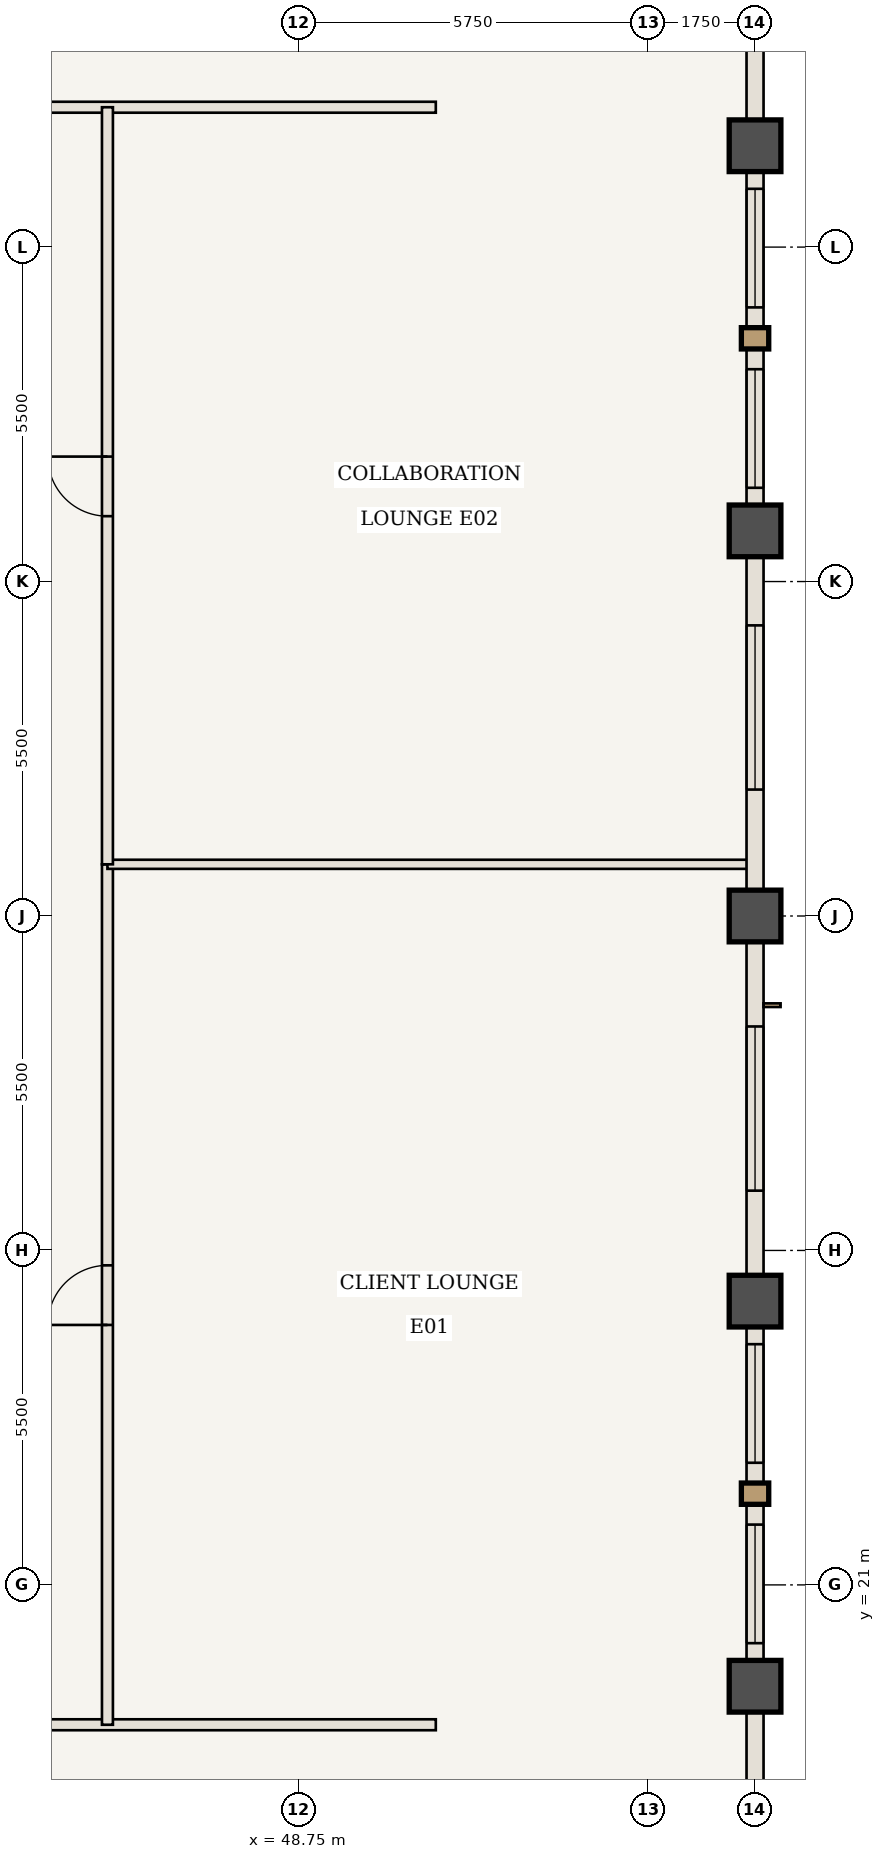
"""IFC4 building model, lengths in metres.
Left out: names, types, materials, properties, quantities, classifications, styles, units other than length and angle.
Written with IfcOpenShell. Run it as: python <this file> out.ifc"""

import sys

from ifc_helpers import new_model, si_unit, direction, frame, frame_2d, origin, origin_2d, place, context, subcontext, project, spatial, rectangle, extrude, element, fill, save


model = new_model("IFC4")
c1 = context("Model", 3, precision=1e-05, world=origin(), true_north=direction((0.0, 1.0)))
c2 = subcontext(c1, "Body", "Model", "MODEL_VIEW")
j1 = project(units=[si_unit("LENGTHUNIT", "METRE"), si_unit("PLANEANGLEUNIT", "RADIAN")], contexts=[c1])
p1 = place(None, origin())
s1 = spatial("IfcSite", under=j1, at=p1, CompositionType="ELEMENT")
p2 = place(p1, origin())
s2 = spatial("IfcBuilding", under=s1, at=p2, CompositionType="ELEMENT")
p3 = place(p2, frame((0.0, 0.0, 213.85)))
s3 = spatial("IfcBuildingStorey", under=s2, at=p3, CompositionType="ELEMENT", Elevation=213.85)
for number, where, z_axis, x_axis in (
    (1, (56.25, 19.333, 0.0), (0.0, 0.0, 1.0), (1.0, 0.0, 0.0)),
    (2, (56.25, 25.667, 0.0), (0.0, 0.0, 1.0), (1.0, 0.0, 0.0)),
    (3, (56.25, 32.0, 0.0), (0.0, 0.0, 1.0), (1.0, 0.0, 0.0)),
    (4, (56.25, 38.333, 0.0), (0.0, 0.0, 1.0), (1.0, 0.0, 0.0)),
    (5, (56.25, 44.667, 0.0), (0.0, 0.0, 1.0), (1.0, 0.0, 0.0)),
):
    element("IfcColumn", number, at=place(p3, frame(where, z_axis=z_axis, x_axis=x_axis)), inside=s3, PredefinedType="COLUMN", context=c2, shape_type="SweptSolid", body=[
        extrude(rectangle(XDim=0.85, YDim=0.85, at=origin_2d()), origin(), (0.0, 0.0, 1.0), 3.85),
    ])
p4 = place(p3, frame((32.925, 18.7, 0.0), z_axis=(0.0, 0.0, 1.0), x_axis=(1.0, 0.0, 0.0)))
e6 = element("IfcWall", 6, at=p4, inside=s3, PredefinedType="STANDARD", context=c2, shape_type="SweptSolid", body=[
    extrude(rectangle(XDim=18.075, YDim=0.18, at=frame_2d((9.038, 0.0))), origin(), (0.0, 0.0, 1.0), 3.685),
])
p5 = place(p4, frame((5.812, 0.0, 0.0)))
e7 = element("IfcOpeningElement", 7, at=p5, cuts=e6, PredefinedType="OPENING", context=c2, shape_type="SweptSolid", body=[
    extrude(rectangle(XDim=0.98, YDim=2.2, at=frame_2d((0.49, 1.1))), frame((0.0, 0.1, 0.0), z_axis=(0.0, -1.0, 0.0), x_axis=(1.0, 0.0, 0.0)), (0.0, 0.0, 1.0), 0.2),
])
p6 = place(p3, frame((24.542, 45.3, 0.0), z_axis=(0.0, 0.0, 1.0), x_axis=(1.0, 0.0, 0.0)))
e8 = element("IfcWall", 8, at=p6, inside=s3, PredefinedType="STANDARD", context=c2, shape_type="SweptSolid", body=[
    extrude(rectangle(XDim=26.458, YDim=0.18, at=frame_2d((13.229, 0.0))), origin(), (0.0, 0.0, 1.0), 3.685),
])
p7 = place(p6, frame((10.004, 0.0, 0.0)))
e9 = element("IfcOpeningElement", 9, at=p7, cuts=e8, PredefinedType="OPENING", context=c2, shape_type="SweptSolid", body=[
    extrude(rectangle(XDim=0.98, YDim=2.2, at=frame_2d((0.49, 1.1))), frame((0.0, 0.1, 0.0), z_axis=(0.0, -1.0, 0.0), x_axis=(1.0, 0.0, 0.0)), (0.0, 0.0, 1.0), 0.2),
])
p8 = place(p3, frame((45.6, 18.7, 0.0), z_axis=(0.0, 0.0, 1.0), x_axis=(0.0, 1.0, 0.0)))
e10 = element("IfcWall", 10, at=p8, inside=s3, PredefinedType="STANDARD", context=c2, shape_type="SweptSolid", body=[
    extrude(rectangle(XDim=14.15, YDim=0.18, at=frame_2d((7.075, 0.0))), origin(), (0.0, 0.0, 1.0), 3.685),
])
p9 = place(p8, frame((6.575, 0.0, 0.0)))
e11 = element("IfcOpeningElement", 11, at=p9, cuts=e10, PredefinedType="OPENING", context=c2, shape_type="SweptSolid", body=[
    extrude(rectangle(XDim=0.98, YDim=2.2, at=frame_2d((0.49, 1.1))), frame((0.0, 0.1, 0.0), z_axis=(0.0, -1.0, 0.0), x_axis=(1.0, 0.0, 0.0)), (0.0, 0.0, 1.0), 0.2),
])
p10 = place(p3, frame((45.6, 32.85, 0.0), z_axis=(0.0, 0.0, 1.0), x_axis=(1.0, 0.0, 0.0)))
e12 = element("IfcWall", 12, at=p10, inside=s3, PredefinedType="STANDARD", context=c2, shape_type="SweptSolid", body=[
    extrude(rectangle(XDim=10.59, YDim=0.15, at=frame_2d((5.295, 0.0))), origin(), (0.0, 0.0, 1.0), 3.685),
])
p11 = place(p3, frame((45.6, 32.85, 0.0), z_axis=(0.0, 0.0, 1.0), x_axis=(0.0, 1.0, 0.0)))
e13 = element("IfcWall", 13, at=p11, inside=s3, PredefinedType="STANDARD", context=c2, shape_type="SweptSolid", body=[
    extrude(rectangle(XDim=12.45, YDim=0.18, at=frame_2d((6.225, 0.0))), origin(), (0.0, 0.0, 1.0), 3.685),
])
p12 = place(p11, frame((5.725, 0.0, 0.0)))
e14 = element("IfcOpeningElement", 14, at=p12, cuts=e13, PredefinedType="OPENING", context=c2, shape_type="SweptSolid", body=[
    extrude(rectangle(XDim=0.98, YDim=2.2, at=frame_2d((0.49, 1.1))), frame((0.0, 0.1, 0.0), z_axis=(0.0, -1.0, 0.0), x_axis=(1.0, 0.0, 0.0)), (0.0, 0.0, 1.0), 0.2),
])
p13 = place(p3, frame((56.25, 19.333, 0.0), z_axis=(0.0, 0.0, 1.0), x_axis=(0.0, -1.0, 0.0)))
e15 = element("IfcWall", 15, at=p13, inside=s3, PredefinedType="USERDEFINED", context=c2, shape_type="SweptSolid", body=[
    extrude(rectangle(XDim=6.333, YDim=0.28, at=frame_2d((3.167, 0.0))), origin(), (0.0, 0.0, 1.0), 2.985),
])
p14 = place(p3, frame((56.25, 25.667, 0.0), z_axis=(0.0, 0.0, 1.0), x_axis=(0.0, -1.0, 0.0)))
e16 = element("IfcWall", 16, at=p14, inside=s3, PredefinedType="USERDEFINED", context=c2, shape_type="SweptSolid", body=[
    extrude(rectangle(XDim=6.333, YDim=0.28, at=frame_2d((3.167, 0.0))), origin(), (0.0, 0.0, 1.0), 2.985),
])
p15 = place(p14, frame((0.708, 0.0, 0.85)))
e17 = element("IfcOpeningElement", 17, at=p15, cuts=e16, PredefinedType="OPENING", context=c2, shape_type="SweptSolid", body=[
    extrude(rectangle(XDim=1.95, YDim=1.935, at=frame_2d((0.975, 0.968))), frame((0.0, 0.15, 0.0), z_axis=(0.0, -1.0, 0.0), x_axis=(1.0, 0.0, 0.0)), (0.0, 0.0, 1.0), 0.3),
])
p16 = place(p14, frame((3.675, 0.0, 0.85)))
e18 = element("IfcOpeningElement", 18, at=p16, cuts=e16, PredefinedType="OPENING", context=c2, shape_type="SweptSolid", body=[
    extrude(rectangle(XDim=1.95, YDim=1.935, at=frame_2d((0.975, 0.968))), frame((0.0, 0.15, 0.0), z_axis=(0.0, -1.0, 0.0), x_axis=(1.0, 0.0, 0.0)), (0.0, 0.0, 1.0), 0.3),
])
p17 = place(p3, frame((56.25, 32.0, 0.0), z_axis=(0.0, 0.0, 1.0), x_axis=(0.0, -1.0, 0.0)))
e19 = element("IfcWall", 19, at=p17, inside=s3, PredefinedType="USERDEFINED", context=c2, shape_type="SweptSolid", body=[
    extrude(rectangle(XDim=6.333, YDim=0.28, at=frame_2d((3.167, 0.0))), origin(), (0.0, 0.0, 1.0), 2.985),
])
p18 = place(p17, frame((1.817, 0.0, 0.85)))
e20 = element("IfcOpeningElement", 20, at=p18, cuts=e19, PredefinedType="OPENING", context=c2, shape_type="SweptSolid", body=[
    extrude(rectangle(XDim=2.7, YDim=1.935, at=frame_2d((1.35, 0.968))), frame((0.0, 0.15, 0.0), z_axis=(0.0, -1.0, 0.0), x_axis=(1.0, 0.0, 0.0)), (0.0, 0.0, 1.0), 0.3),
])
p19 = place(p3, frame((56.25, 38.333, 0.0), z_axis=(0.0, 0.0, 1.0), x_axis=(0.0, -1.0, 0.0)))
e21 = element("IfcWall", 21, at=p19, inside=s3, PredefinedType="USERDEFINED", context=c2, shape_type="SweptSolid", body=[
    extrude(rectangle(XDim=6.333, YDim=0.28, at=frame_2d((3.167, 0.0))), origin(), (0.0, 0.0, 1.0), 2.985),
])
p20 = place(p19, frame((1.554, 0.0, 0.85)))
e22 = element("IfcOpeningElement", 22, at=p20, cuts=e21, PredefinedType="OPENING", context=c2, shape_type="SweptSolid", body=[
    extrude(rectangle(XDim=2.7, YDim=1.935, at=frame_2d((1.35, 0.968))), frame((0.0, 0.15, 0.0), z_axis=(0.0, -1.0, 0.0), x_axis=(1.0, 0.0, 0.0)), (0.0, 0.0, 1.0), 0.3),
])
p21 = place(p3, frame((56.25, 44.667, 0.0), z_axis=(0.0, 0.0, 1.0), x_axis=(0.0, -1.0, 0.0)))
e23 = element("IfcWall", 23, at=p21, inside=s3, PredefinedType="USERDEFINED", context=c2, shape_type="SweptSolid", body=[
    extrude(rectangle(XDim=6.333, YDim=0.28, at=frame_2d((3.167, 0.0))), origin(), (0.0, 0.0, 1.0), 2.985),
])
p22 = place(p21, frame((0.708, 0.0, 0.85)))
e24 = element("IfcOpeningElement", 24, at=p22, cuts=e23, PredefinedType="OPENING", context=c2, shape_type="SweptSolid", body=[
    extrude(rectangle(XDim=1.95, YDim=1.935, at=frame_2d((0.975, 0.968))), frame((0.0, 0.15, 0.0), z_axis=(0.0, -1.0, 0.0), x_axis=(1.0, 0.0, 0.0)), (0.0, 0.0, 1.0), 0.3),
])
p23 = place(p21, frame((3.675, 0.0, 0.85)))
e25 = element("IfcOpeningElement", 25, at=p23, cuts=e23, PredefinedType="OPENING", context=c2, shape_type="SweptSolid", body=[
    extrude(rectangle(XDim=1.95, YDim=1.935, at=frame_2d((0.975, 0.968))), frame((0.0, 0.15, 0.0), z_axis=(0.0, -1.0, 0.0), x_axis=(1.0, 0.0, 0.0)), (0.0, 0.0, 1.0), 0.3),
])
p24 = place(p3, frame((56.25, 51.0, 0.0), z_axis=(0.0, 0.0, 1.0), x_axis=(0.0, -1.0, 0.0)))
e26 = element("IfcWall", 26, at=p24, inside=s3, PredefinedType="USERDEFINED", context=c2, shape_type="SweptSolid", body=[
    extrude(rectangle(XDim=6.333, YDim=0.28, at=frame_2d((3.167, 0.0))), origin(), (0.0, 0.0, 1.0), 2.985),
])
p25 = place(p9, origin())
e27 = element("IfcDoor", 27, at=p25, inside=s3, OperationType="SINGLE_SWING_LEFT", PredefinedType="DOOR", context=c2, shape_type="SweptSolid", body=[
    extrude(rectangle(XDim=0.98, YDim=2.2, at=frame_2d((0.49, 1.1))), frame((0.0, 0.025, 0.0), z_axis=(0.0, -1.0, 0.0), x_axis=(1.0, 0.0, 0.0)), (0.0, 0.0, 1.0), 0.05),
])
fill(e11, e27)
p26 = place(p12, origin())
e28 = element("IfcDoor", 28, at=p26, inside=s3, OperationType="SINGLE_SWING_RIGHT", PredefinedType="DOOR", context=c2, shape_type="SweptSolid", body=[
    extrude(rectangle(XDim=0.98, YDim=2.2, at=frame_2d((0.49, 1.1))), frame((0.0, 0.025, 0.0), z_axis=(0.0, -1.0, 0.0), x_axis=(1.0, 0.0, 0.0)), (0.0, 0.0, 1.0), 0.05),
])
fill(e14, e28)
p27 = place(p15, origin())
e29 = element("IfcWindow", 29, at=p27, inside=s3, PartitioningType="SINGLE_PANEL", PredefinedType="WINDOW", context=c2, shape_type="SweptSolid", body=[
    extrude(rectangle(XDim=1.95, YDim=1.935, at=frame_2d((0.975, 0.968))), frame((0.0, 0.03, 0.0), z_axis=(0.0, -1.0, 0.0), x_axis=(1.0, 0.0, 0.0)), (0.0, 0.0, 1.0), 0.06),
])
fill(e17, e29)
p28 = place(p16, origin())
e30 = element("IfcWindow", 30, at=p28, inside=s3, PartitioningType="SINGLE_PANEL", PredefinedType="WINDOW", context=c2, shape_type="SweptSolid", body=[
    extrude(rectangle(XDim=1.95, YDim=1.935, at=frame_2d((0.975, 0.968))), frame((0.0, 0.03, 0.0), z_axis=(0.0, -1.0, 0.0), x_axis=(1.0, 0.0, 0.0)), (0.0, 0.0, 1.0), 0.06),
])
fill(e18, e30)
p29 = place(p18, origin())
e31 = element("IfcWindow", 31, at=p29, inside=s3, PartitioningType="SINGLE_PANEL", PredefinedType="WINDOW", context=c2, shape_type="SweptSolid", body=[
    extrude(rectangle(XDim=2.7, YDim=1.935, at=frame_2d((1.35, 0.968))), frame((0.0, 0.03, 0.0), z_axis=(0.0, -1.0, 0.0), x_axis=(1.0, 0.0, 0.0)), (0.0, 0.0, 1.0), 0.06),
])
fill(e20, e31)
p30 = place(p20, origin())
e32 = element("IfcWindow", 32, at=p30, inside=s3, PartitioningType="SINGLE_PANEL", PredefinedType="WINDOW", context=c2, shape_type="SweptSolid", body=[
    extrude(rectangle(XDim=2.7, YDim=1.935, at=frame_2d((1.35, 0.968))), frame((0.0, 0.03, 0.0), z_axis=(0.0, -1.0, 0.0), x_axis=(1.0, 0.0, 0.0)), (0.0, 0.0, 1.0), 0.06),
])
fill(e22, e32)
p31 = place(p22, origin())
e33 = element("IfcWindow", 33, at=p31, inside=s3, PartitioningType="SINGLE_PANEL", PredefinedType="WINDOW", context=c2, shape_type="SweptSolid", body=[
    extrude(rectangle(XDim=1.95, YDim=1.935, at=frame_2d((0.975, 0.968))), frame((0.0, 0.03, 0.0), z_axis=(0.0, -1.0, 0.0), x_axis=(1.0, 0.0, 0.0)), (0.0, 0.0, 1.0), 0.06),
])
fill(e24, e33)
p32 = place(p23, origin())
e34 = element("IfcWindow", 34, at=p32, inside=s3, PartitioningType="SINGLE_PANEL", PredefinedType="WINDOW", context=c2, shape_type="SweptSolid", body=[
    extrude(rectangle(XDim=1.95, YDim=1.935, at=frame_2d((0.975, 0.968))), frame((0.0, 0.03, 0.0), z_axis=(0.0, -1.0, 0.0), x_axis=(1.0, 0.0, 0.0)), (0.0, 0.0, 1.0), 0.06),
])
fill(e25, e34)
save(model, sys.argv[1])
